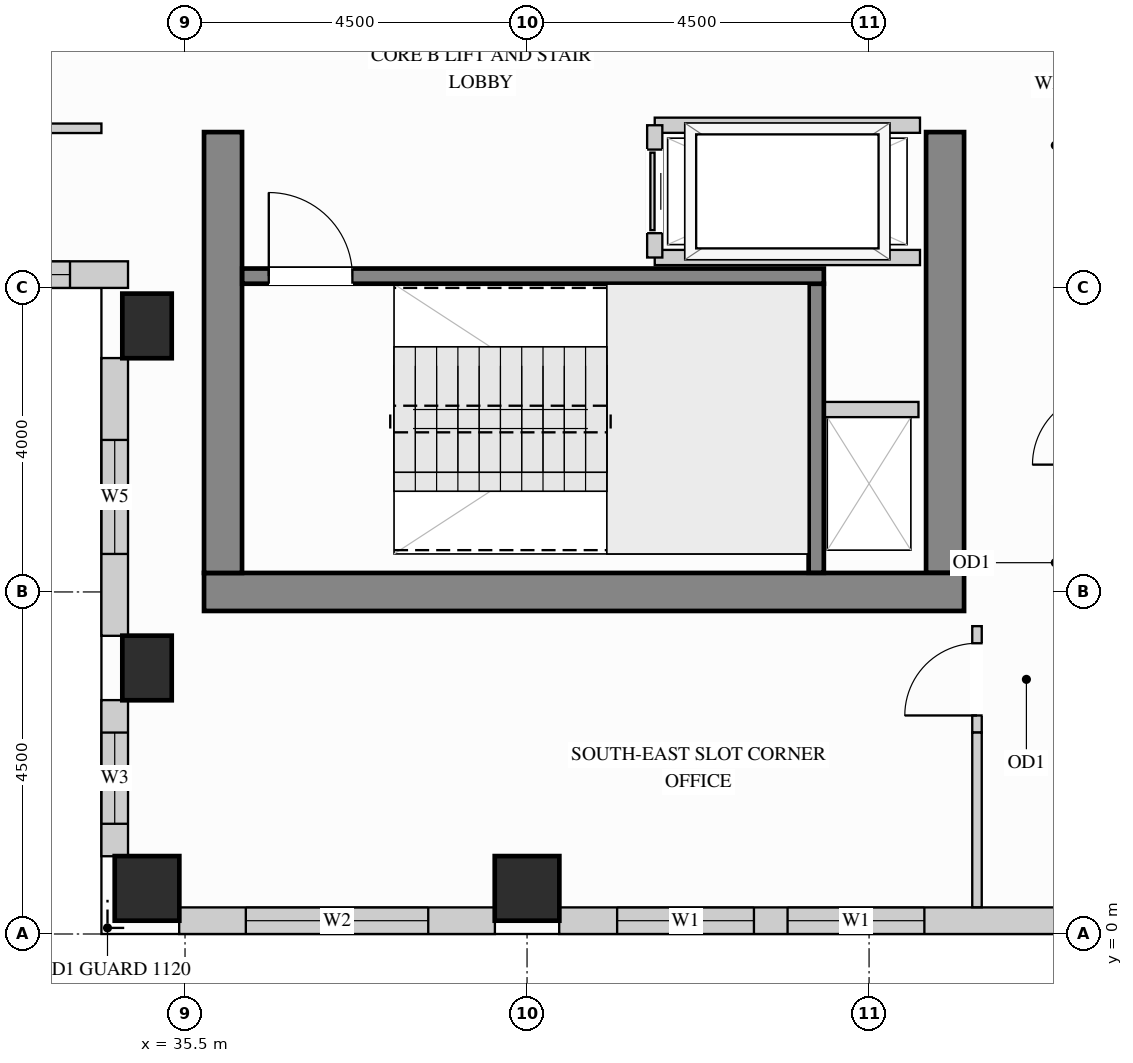
"""IFC4 building model, lengths in metres.
Left out: names, types, materials, properties, quantities, classifications, styles, units other than length and angle.
Written with IfcOpenShell. Run it as: python <this file> out.ifc"""

import sys

from ifc_helpers import new_model, si_unit, direction, frame, frame_2d, origin, origin_2d, place, context, subcontext, project, spatial, rectangle, extrude, source, transform, mapped, element, fill, save


model = new_model("IFC4")
c1 = context("Model", 3, precision=1e-05, world=origin(), true_north=direction((0.0, 1.0)))
c2 = subcontext(c1, "Body", "Model", "MODEL_VIEW")
j1 = project(units=[si_unit("LENGTHUNIT", "METRE"), si_unit("PLANEANGLEUNIT", "RADIAN")], contexts=[c1])
p1 = place(None, origin())
s1 = spatial("IfcSite", under=j1, at=p1, CompositionType="ELEMENT")
p2 = place(p1, origin())
s2 = spatial("IfcBuilding", under=s1, at=p2, CompositionType="ELEMENT")
p3 = place(p2, frame((0.0, 0.0, 230.4)))
s3 = spatial("IfcBuildingStorey", under=s2, at=p3, CompositionType="ELEMENT", Elevation=230.4)
m1 = source(origin(), c2, "Body", "SweptSolid", [
    extrude(rectangle(XDim=0.65, YDim=0.85, at=origin_2d()), origin(), (0.0, 0.0, 1.0), 3.4),
])
for number, where, z_axis, x_axis in (
    (1, (35.0, 3.5, 0.0), (0.0, 0.0, 1.0), (1.0, 0.0, 0.0)),
    (2, (35.0, 8.0, 0.0), (0.0, 0.0, 1.0), (1.0, 0.0, 0.0)),
):
    element("IfcColumn", number, at=place(p3, frame(where, z_axis=z_axis, x_axis=x_axis)), inside=s3, PredefinedType="COLUMN", context=c2, shape_type="MappedRepresentation", body=[
        mapped(m1, transform((0.0, 0.0, 0.0), x_axis=(1.0, 0.0, 0.0), y_axis=(0.0, 1.0, 0.0), z_axis=(0.0, 0.0, 1.0))),
    ])
m2 = source(origin(), c2, "Body", "SweptSolid", [
    extrude(rectangle(XDim=0.85, YDim=0.85, at=origin_2d()), origin(), (0.0, 0.0, 1.0), 3.4),
])
for number, where, z_axis, x_axis in (
    (3, (35.0, 0.6, 0.0), (0.0, 0.0, 1.0), (1.0, 0.0, 0.0)),
    (4, (40.0, 0.6, 0.0), (0.0, 0.0, 1.0), (1.0, 0.0, 0.0)),
):
    element("IfcColumn", number, at=place(p3, frame(where, z_axis=z_axis, x_axis=x_axis)), inside=s3, PredefinedType="COLUMN", context=c2, shape_type="MappedRepresentation", body=[
        mapped(m2, transform((0.0, 0.0, 0.0), x_axis=(1.0, 0.0, 0.0), y_axis=(0.0, 1.0, 0.0), z_axis=(0.0, 0.0, 1.0))),
    ])
m3 = source(origin(), c2, "Body", "SweptSolid", [
    extrude(rectangle(XDim=5.8, YDim=0.5, at=frame_2d((2.9, 0.0))), origin(), (0.0, 0.0, 1.0), 3.4),
])
p4 = place(p3, frame((45.5, 4.75, 0.0), z_axis=(0.0, 0.0, 1.0), x_axis=(0.0, 1.0, 0.0)))
e5 = element("IfcWall", 5, at=p4, inside=s3, PredefinedType="SHEAR", context=c2, shape_type="MappedRepresentation", body=[
    mapped(m3, transform((0.0, 0.0, 0.0), x_axis=(1.0, 0.0, 0.0), y_axis=(0.0, 1.0, 0.0), z_axis=(0.0, 0.0, 1.0))),
])
m4 = source(origin(), c2, "Body", "SweptSolid", [
    extrude(rectangle(XDim=10.0, YDim=0.5, at=frame_2d((5.0, 0.0))), origin(), (0.0, 0.0, 1.0), 3.4),
])
p5 = place(p3, frame((35.75, 4.5, 0.0), z_axis=(0.0, 0.0, 1.0), x_axis=(1.0, 0.0, 0.0)))
e6 = element("IfcWall", 6, at=p5, inside=s3, PredefinedType="SHEAR", context=c2, shape_type="MappedRepresentation", body=[
    mapped(m4, transform((0.0, 0.0, 0.0), x_axis=(1.0, 0.0, 0.0), y_axis=(0.0, 1.0, 0.0), z_axis=(0.0, 0.0, 1.0))),
])
p6 = place(p3, frame((36.0, 4.75, 0.0), z_axis=(0.0, 0.0, 1.0), x_axis=(0.0, 1.0, 0.0)))
e7 = element("IfcWall", 7, at=p6, inside=s3, PredefinedType="SHEAR", context=c2, shape_type="MappedRepresentation", body=[
    mapped(m3, transform((0.0, 0.0, 0.0), x_axis=(1.0, 0.0, 0.0), y_axis=(0.0, 1.0, 0.0), z_axis=(0.0, 0.0, 1.0))),
])
p7 = place(p3, frame((19.323, 8.675, 0.0), z_axis=(0.0, 0.0, 1.0), x_axis=(1.0, 0.0, 0.0)))
e8 = element("IfcWall", 8, at=p7, inside=s3, PredefinedType="SOLIDWALL", context=c2, shape_type="SweptSolid", body=[
    extrude(rectangle(XDim=15.427, YDim=0.35, at=frame_2d((7.713, 0.0))), origin(), (0.0, 0.0, 1.0), 3.385),
])
p8 = place(p7, frame((0.639, 0.0, 0.78)))
e9 = element("IfcOpeningElement", 9, at=p8, cuts=e8, PredefinedType="OPENING", context=c2, shape_type="SweptSolid", body=[
    extrude(rectangle(XDim=1.5, YDim=2.0, at=frame_2d((0.75, 1.0))), frame((0.0, 0.185, 0.0), z_axis=(0.0, -1.0, 0.0), x_axis=(1.0, 0.0, 0.0)), (0.0, 0.0, 1.0), 0.37),
])
p9 = place(p7, frame((2.458, 0.0, 0.78)))
e10 = element("IfcOpeningElement", 10, at=p9, cuts=e8, PredefinedType="OPENING", context=c2, shape_type="SweptSolid", body=[
    extrude(rectangle(XDim=1.5, YDim=2.0, at=frame_2d((0.75, 1.0))), frame((0.0, 0.185, 0.0), z_axis=(0.0, -1.0, 0.0), x_axis=(1.0, 0.0, 0.0)), (0.0, 0.0, 1.0), 0.37),
])
p10 = place(p7, frame((5.61, 0.0, 0.78)))
e11 = element("IfcOpeningElement", 11, at=p10, cuts=e8, PredefinedType="OPENING", context=c2, shape_type="SweptSolid", body=[
    extrude(rectangle(XDim=1.5, YDim=2.0, at=frame_2d((0.75, 1.0))), frame((0.0, 0.185, 0.0), z_axis=(0.0, -1.0, 0.0), x_axis=(1.0, 0.0, 0.0)), (0.0, 0.0, 1.0), 0.37),
])
p11 = place(p7, frame((7.944, 0.0, 0.78)))
e12 = element("IfcOpeningElement", 12, at=p11, cuts=e8, PredefinedType="OPENING", context=c2, shape_type="SweptSolid", body=[
    extrude(rectangle(XDim=1.5, YDim=2.0, at=frame_2d((0.75, 1.0))), frame((0.0, 0.185, 0.0), z_axis=(0.0, -1.0, 0.0), x_axis=(1.0, 0.0, 0.0)), (0.0, 0.0, 1.0), 0.37),
])
p12 = place(p7, frame((11.22, 0.0, 0.78)))
e13 = element("IfcOpeningElement", 13, at=p12, cuts=e8, PredefinedType="OPENING", context=c2, shape_type="SweptSolid", body=[
    extrude(rectangle(XDim=1.5, YDim=2.0, at=frame_2d((0.75, 1.0))), frame((0.0, 0.185, 0.0), z_axis=(0.0, -1.0, 0.0), x_axis=(1.0, 0.0, 0.0)), (0.0, 0.0, 1.0), 0.37),
])
p13 = place(p7, frame((13.164, 0.0, 0.78)))
e14 = element("IfcOpeningElement", 14, at=p13, cuts=e8, PredefinedType="OPENING", context=c2, shape_type="SweptSolid", body=[
    extrude(rectangle(XDim=1.5, YDim=2.0, at=frame_2d((0.75, 1.0))), frame((0.0, 0.185, 0.0), z_axis=(0.0, -1.0, 0.0), x_axis=(1.0, 0.0, 0.0)), (0.0, 0.0, 1.0), 0.37),
])
p14 = place(p3, frame((34.575, 7.577, 0.0), z_axis=(0.0, 0.0, 1.0), x_axis=(0.0, -1.0, 0.0)))
e15 = element("IfcWall", 15, at=p14, inside=s3, PredefinedType="SOLIDWALL", context=c2, shape_type="SweptSolid", body=[
    extrude(rectangle(XDim=3.654, YDim=0.35, at=frame_2d((1.827, 0.0))), origin(), (0.0, 0.0, 1.0), 3.385),
])
p15 = place(p14, frame((1.077, 0.0, 0.78)))
e16 = element("IfcOpeningElement", 16, at=p15, cuts=e15, PredefinedType="OPENING", context=c2, shape_type="SweptSolid", body=[
    extrude(rectangle(XDim=1.5, YDim=2.0, at=frame_2d((0.75, 1.0))), frame((0.0, 0.185, 0.0), z_axis=(0.0, -1.0, 0.0), x_axis=(1.0, 0.0, 0.0)), (0.0, 0.0, 1.0), 0.37),
])
p16 = place(p3, frame((34.575, 3.077, 0.0), z_axis=(0.0, 0.0, 1.0), x_axis=(0.0, -1.0, 0.0)))
e17 = element("IfcWall", 17, at=p16, inside=s3, PredefinedType="SOLIDWALL", context=c2, shape_type="SweptSolid", body=[
    extrude(rectangle(XDim=2.054, YDim=0.35, at=frame_2d((1.027, 0.0))), origin(), (0.0, 0.0, 1.0), 3.385),
])
p17 = place(p16, frame((0.427, 0.0, 0.78)))
e18 = element("IfcOpeningElement", 18, at=p17, cuts=e17, PredefinedType="OPENING", context=c2, shape_type="SweptSolid", body=[
    extrude(rectangle(XDim=1.2, YDim=2.0, at=frame_2d((0.6, 1.0))), frame((0.0, 0.185, 0.0), z_axis=(0.0, -1.0, 0.0), x_axis=(1.0, 0.0, 0.0)), (0.0, 0.0, 1.0), 0.37),
])
p18 = place(p3, frame((35.423, 0.175, 0.0), z_axis=(0.0, 0.0, 1.0), x_axis=(1.0, 0.0, 0.0)))
e19 = element("IfcWall", 19, at=p18, inside=s3, PredefinedType="SOLIDWALL", context=c2, shape_type="SweptSolid", body=[
    extrude(rectangle(XDim=4.154, YDim=0.35, at=frame_2d((2.077, 0.0))), origin(), (0.0, 0.0, 1.0), 3.385),
])
p19 = place(p18, frame((0.877, 0.0, 0.78)))
e20 = element("IfcOpeningElement", 20, at=p19, cuts=e19, PredefinedType="OPENING", context=c2, shape_type="SweptSolid", body=[
    extrude(rectangle(XDim=2.4, YDim=2.1, at=frame_2d((1.2, 1.05))), frame((0.0, 0.185, 0.0), z_axis=(0.0, -1.0, 0.0), x_axis=(1.0, 0.0, 0.0)), (0.0, 0.0, 1.0), 0.37),
])
p20 = place(p3, frame((40.423, 0.175, 0.0), z_axis=(0.0, 0.0, 1.0), x_axis=(1.0, 0.0, 0.0)))
e21 = element("IfcWall", 21, at=p20, inside=s3, PredefinedType="SOLIDWALL", context=c2, shape_type="SweptSolid", body=[
    extrude(rectangle(XDim=7.077, YDim=0.35, at=frame_2d((3.539, 0.0))), origin(), (0.0, 0.0, 1.0), 3.385),
])
p21 = place(p20, frame((0.762, 0.0, 0.78)))
e22 = element("IfcOpeningElement", 22, at=p21, cuts=e21, PredefinedType="OPENING", context=c2, shape_type="SweptSolid", body=[
    extrude(rectangle(XDim=1.8, YDim=2.1, at=frame_2d((0.9, 1.05))), frame((0.0, 0.185, 0.0), z_axis=(0.0, -1.0, 0.0), x_axis=(1.0, 0.0, 0.0)), (0.0, 0.0, 1.0), 0.37),
])
p22 = place(p20, frame((3.005, 0.0, 0.78)))
e23 = element("IfcOpeningElement", 23, at=p22, cuts=e21, PredefinedType="OPENING", context=c2, shape_type="SweptSolid", body=[
    extrude(rectangle(XDim=1.8, YDim=2.1, at=frame_2d((0.9, 1.05))), frame((0.0, 0.185, 0.0), z_axis=(0.0, -1.0, 0.0), x_axis=(1.0, 0.0, 0.0)), (0.0, 0.0, 1.0), 0.37),
])
p23 = place(p3, frame((45.92, 2.65, 0.0), z_axis=(0.0, 0.0, 1.0), x_axis=(0.0, 1.0, 0.0)))
e24 = element("IfcWall", 24, at=p23, inside=s3, PredefinedType="PARTITIONING", context=c2, shape_type="SweptSolid", body=[
    extrude(rectangle(XDim=1.4, YDim=0.125, at=frame_2d((0.7, 0.0))), origin(), (0.0, 0.0, 1.0), 3.385),
])
p24 = place(p23, frame((0.225, 0.0, 0.0)))
e25 = element("IfcOpeningElement", 25, at=p24, cuts=e24, PredefinedType="OPENING", context=c2, shape_type="SweptSolid", body=[
    extrude(rectangle(XDim=0.95, YDim=2.15, at=frame_2d((0.475, 1.075))), frame((0.0, 0.073, 0.0), z_axis=(0.0, -1.0, 0.0), x_axis=(1.0, 0.0, 0.0)), (0.0, 0.0, 1.0), 0.145),
])
m5 = source(origin(), c2, "Body", "SweptSolid", [
    extrude(rectangle(XDim=2.298, YDim=0.125, at=frame_2d((1.149, 0.0))), origin(), (0.0, 0.0, 1.0), 3.385),
])
p25 = place(p3, frame((45.92, 0.352, 0.0), z_axis=(0.0, 0.0, 1.0), x_axis=(0.0, 1.0, 0.0)))
e26 = element("IfcWall", 26, at=p25, inside=s3, PredefinedType="PARTITIONING", context=c2, shape_type="MappedRepresentation", body=[
    mapped(m5, transform((0.0, 0.0, 0.0), x_axis=(1.0, 0.0, 0.0), y_axis=(0.0, 1.0, 0.0), z_axis=(0.0, 0.0, 1.0))),
])
p26 = place(p3, frame((29.85, 10.6, 0.0), z_axis=(0.0, 0.0, 1.0), x_axis=(1.0, 0.0, 0.0)))
e27 = element("IfcWall", 27, at=p26, inside=s3, PredefinedType="PARTITIONING", context=c2, shape_type="SweptSolid", body=[
    extrude(rectangle(XDim=4.55, YDim=0.125, at=frame_2d((2.275, 0.0))), origin(), (0.0, 0.0, 1.0), 3.385),
])
p27 = place(p26, frame((1.8, 0.0, 0.0)))
e28 = element("IfcOpeningElement", 28, at=p27, cuts=e27, PredefinedType="OPENING", context=c2, shape_type="SweptSolid", body=[
    extrude(rectangle(XDim=0.95, YDim=2.15, at=frame_2d((0.475, 1.075))), frame((0.0, 0.073, 0.0), z_axis=(0.0, -1.0, 0.0), x_axis=(1.0, 0.0, 0.0)), (0.0, 0.0, 1.0), 0.145),
])
m6 = source(origin(), c2, "Body", "SweptSolid", [
    extrude(rectangle(XDim=1.3, YDim=0.2, at=frame_2d((0.65, 0.0))), origin(), (0.0, 0.0, 1.0), 3.385),
])
p28 = place(p3, frame((43.85, 6.9, 0.0), z_axis=(0.0, 0.0, 1.0), x_axis=(1.0, 0.0, 0.0)))
e29 = element("IfcWall", 29, at=p28, inside=s3, PredefinedType="PARTITIONING", context=c2, shape_type="MappedRepresentation", body=[
    mapped(m6, transform((0.0, 0.0, 0.0), x_axis=(1.0, 0.0, 0.0), y_axis=(0.0, 1.0, 0.0), z_axis=(0.0, 0.0, 1.0))),
])
m7 = source(origin(), c2, "Body", "SweptSolid", [
    extrude(rectangle(XDim=3.49, YDim=0.2, at=frame_2d((1.745, 0.0))), origin(), (0.0, 0.0, 1.0), 3.385),
])
for number, where, z_axis, x_axis in (
    (30, (41.68, 10.64, 0.0), (0.0, 0.0, 1.0), (1.0, 0.0, 0.0)),
    (31, (41.68, 8.9, 0.0), (0.0, 0.0, 1.0), (1.0, 0.0, 0.0)),
):
    element("IfcWall", number, at=place(p3, frame(where, z_axis=z_axis, x_axis=x_axis)), inside=s3, PredefinedType="PARTITIONING", context=c2, shape_type="MappedRepresentation", body=[
        mapped(m7, transform((0.0, 0.0, 0.0), x_axis=(1.0, 0.0, 0.0), y_axis=(0.0, 1.0, 0.0), z_axis=(0.0, 0.0, 1.0))),
    ])
p29 = place(p3, frame((41.68, 8.9, 0.0), z_axis=(0.0, 0.0, 1.0), x_axis=(0.0, 1.0, 0.0)))
e32 = element("IfcWall", 32, at=p29, inside=s3, PredefinedType="PARTITIONING", context=c2, shape_type="SweptSolid", body=[
    extrude(rectangle(XDim=1.74, YDim=0.2, at=frame_2d((0.87, 0.0))), origin(), (0.0, 0.0, 1.0), 3.385),
])
p30 = place(p29, frame((0.32, 0.0, 0.0)))
e33 = element("IfcOpeningElement", 33, at=p30, cuts=e32, PredefinedType="OPENING", context=c2, shape_type="SweptSolid", body=[
    extrude(rectangle(XDim=1.1, YDim=2.2, at=frame_2d((0.55, 1.1))), frame((0.0, 0.11, 0.0), z_axis=(0.0, -1.0, 0.0), x_axis=(1.0, 0.0, 0.0)), (0.0, 0.0, 1.0), 0.22),
])
m8 = source(origin(), c2, "Body", "SweptSolid", [
    extrude(rectangle(XDim=3.803, YDim=0.2, at=frame_2d((1.901, 0.0))), origin(), (0.0, 0.0, 1.0), 3.4),
])
p31 = place(p3, frame((43.805, 4.752, 0.0), z_axis=(0.0, 0.0, 1.0), x_axis=(0.0, 1.0, 0.0)))
e34 = element("IfcWall", 34, at=p31, inside=s3, PredefinedType="SHEAR", context=c2, shape_type="MappedRepresentation", body=[
    mapped(m8, transform((0.0, 0.0, 0.0), x_axis=(1.0, 0.0, 0.0), y_axis=(0.0, 1.0, 0.0), z_axis=(0.0, 0.0, 1.0))),
])
p32 = place(p3, frame((36.252, 8.655, 0.0), z_axis=(0.0, 0.0, 1.0), x_axis=(1.0, 0.0, 0.0)))
e35 = element("IfcWall", 35, at=p32, inside=s3, PredefinedType="SHEAR", context=c2, shape_type="SweptSolid", body=[
    extrude(rectangle(XDim=7.653, YDim=0.2, at=frame_2d((3.827, 0.0))), origin(), (0.0, 0.0, 1.0), 3.4),
])
p33 = place(p32, frame((0.35, 0.0, 0.0)))
e36 = element("IfcOpeningElement", 36, at=p33, cuts=e35, PredefinedType="OPENING", context=c2, shape_type="SweptSolid", body=[
    extrude(rectangle(XDim=1.1, YDim=2.15, at=frame_2d((0.55, 1.075))), frame((0.0, 0.11, 0.0), z_axis=(0.0, -1.0, 0.0), x_axis=(1.0, 0.0, 0.0)), (0.0, 0.0, 1.0), 0.22),
])
m9 = source(origin(), c2, "Body", "SweptSolid", [
    extrude(rectangle(XDim=1.1, YDim=2.2, at=frame_2d((0.55, 1.1))), frame((0.0, 0.025, 0.0), z_axis=(0.0, -1.0, 0.0), x_axis=(1.0, 0.0, 0.0)), (0.0, 0.0, 1.0), 0.05),
])
p34 = place(p30, origin())
e37 = element("IfcDoor", 37, at=p34, inside=s3, OperationType="SLIDING_TO_LEFT", PredefinedType="DOOR", context=c2, shape_type="MappedRepresentation", body=[
    mapped(m9, transform((0.0, 0.0, 0.0), x_axis=(1.0, 0.0, 0.0), y_axis=(0.0, 1.0, 0.0), z_axis=(0.0, 0.0, 1.0))),
])
fill(e33, e37)
m10 = source(origin(), c2, "Body", "SweptSolid", [
    extrude(rectangle(XDim=0.95, YDim=2.15, at=frame_2d((0.475, 1.075))), frame((0.0, 0.025, 0.0), z_axis=(0.0, -1.0, 0.0), x_axis=(1.0, 0.0, 0.0)), (0.0, 0.0, 1.0), 0.05),
])
p35 = place(p24, origin())
e38 = element("IfcDoor", 38, at=p35, inside=s3, OperationType="SINGLE_SWING_LEFT", PredefinedType="DOOR", context=c2, shape_type="MappedRepresentation", body=[
    mapped(m10, transform((0.0, 0.0, 0.0), x_axis=(1.0, 0.0, 0.0), y_axis=(0.0, 1.0, 0.0), z_axis=(0.0, 0.0, 1.0))),
])
fill(e25, e38)
m11 = source(origin(), c2, "Body", "SweptSolid", [
    extrude(rectangle(XDim=1.1, YDim=2.15, at=frame_2d((0.55, 1.075))), frame((0.0, 0.025, 0.0), z_axis=(0.0, -1.0, 0.0), x_axis=(1.0, 0.0, 0.0)), (0.0, 0.0, 1.0), 0.05),
])
p36 = place(p33, origin())
e39 = element("IfcDoor", 39, at=p36, inside=s3, OperationType="SINGLE_SWING_LEFT", PredefinedType="DOOR", context=c2, shape_type="MappedRepresentation", body=[
    mapped(m11, transform((0.0, 0.0, 0.0), x_axis=(1.0, 0.0, 0.0), y_axis=(0.0, 1.0, 0.0), z_axis=(0.0, 0.0, 1.0))),
])
fill(e36, e39)
m12 = source(origin(), c2, "Body", "SweptSolid", [
    extrude(rectangle(XDim=1.8, YDim=2.1, at=frame_2d((0.9, 1.05))), frame((0.0, 0.03, 0.0), z_axis=(0.0, -1.0, 0.0), x_axis=(1.0, 0.0, 0.0)), (0.0, 0.0, 1.0), 0.06),
])
p37 = place(p21, origin())
e40 = element("IfcWindow", 40, at=p37, inside=s3, PartitioningType="SINGLE_PANEL", PredefinedType="WINDOW", context=c2, shape_type="MappedRepresentation", body=[
    mapped(m12, transform((0.0, 0.0, 0.0), x_axis=(1.0, 0.0, 0.0), y_axis=(0.0, 1.0, 0.0), z_axis=(0.0, 0.0, 1.0))),
])
fill(e22, e40)
p38 = place(p22, origin())
e41 = element("IfcWindow", 41, at=p38, inside=s3, PartitioningType="SINGLE_PANEL", PredefinedType="WINDOW", context=c2, shape_type="MappedRepresentation", body=[
    mapped(m12, transform((0.0, 0.0, 0.0), x_axis=(1.0, 0.0, 0.0), y_axis=(0.0, 1.0, 0.0), z_axis=(0.0, 0.0, 1.0))),
])
fill(e23, e41)
m13 = source(origin(), c2, "Body", "SweptSolid", [
    extrude(rectangle(XDim=2.4, YDim=2.1, at=frame_2d((1.2, 1.05))), frame((0.0, 0.03, 0.0), z_axis=(0.0, -1.0, 0.0), x_axis=(1.0, 0.0, 0.0)), (0.0, 0.0, 1.0), 0.06),
])
p39 = place(p19, origin())
e42 = element("IfcWindow", 42, at=p39, inside=s3, PartitioningType="SINGLE_PANEL", PredefinedType="WINDOW", context=c2, shape_type="MappedRepresentation", body=[
    mapped(m13, transform((0.0, 0.0, 0.0), x_axis=(1.0, 0.0, 0.0), y_axis=(0.0, 1.0, 0.0), z_axis=(0.0, 0.0, 1.0))),
])
fill(e20, e42)
m14 = source(origin(), c2, "Body", "SweptSolid", [
    extrude(rectangle(XDim=1.2, YDim=2.0, at=frame_2d((0.6, 1.0))), frame((0.0, 0.03, 0.0), z_axis=(0.0, -1.0, 0.0), x_axis=(1.0, 0.0, 0.0)), (0.0, 0.0, 1.0), 0.06),
])
p40 = place(p17, origin())
e43 = element("IfcWindow", 43, at=p40, inside=s3, PartitioningType="SINGLE_PANEL", PredefinedType="WINDOW", context=c2, shape_type="MappedRepresentation", body=[
    mapped(m14, transform((0.0, 0.0, 0.0), x_axis=(1.0, 0.0, 0.0), y_axis=(0.0, 1.0, 0.0), z_axis=(0.0, 0.0, 1.0))),
])
fill(e18, e43)
m15 = source(origin(), c2, "Body", "SweptSolid", [
    extrude(rectangle(XDim=1.5, YDim=2.0, at=frame_2d((0.75, 1.0))), frame((0.0, 0.03, 0.0), z_axis=(0.0, -1.0, 0.0), x_axis=(1.0, 0.0, 0.0)), (0.0, 0.0, 1.0), 0.06),
])
p41 = place(p13, origin())
e44 = element("IfcWindow", 44, at=p41, inside=s3, PartitioningType="SINGLE_PANEL", PredefinedType="WINDOW", context=c2, shape_type="MappedRepresentation", body=[
    mapped(m15, transform((0.0, 0.0, 0.0), x_axis=(1.0, 0.0, 0.0), y_axis=(0.0, 1.0, 0.0), z_axis=(0.0, 0.0, 1.0))),
])
fill(e14, e44)
p42 = place(p15, origin())
e45 = element("IfcWindow", 45, at=p42, inside=s3, PartitioningType="SINGLE_PANEL", PredefinedType="WINDOW", context=c2, shape_type="MappedRepresentation", body=[
    mapped(m15, transform((0.0, 0.0, 0.0), x_axis=(1.0, 0.0, 0.0), y_axis=(0.0, 1.0, 0.0), z_axis=(0.0, 0.0, 1.0))),
])
fill(e16, e45)
save(model, sys.argv[1])
